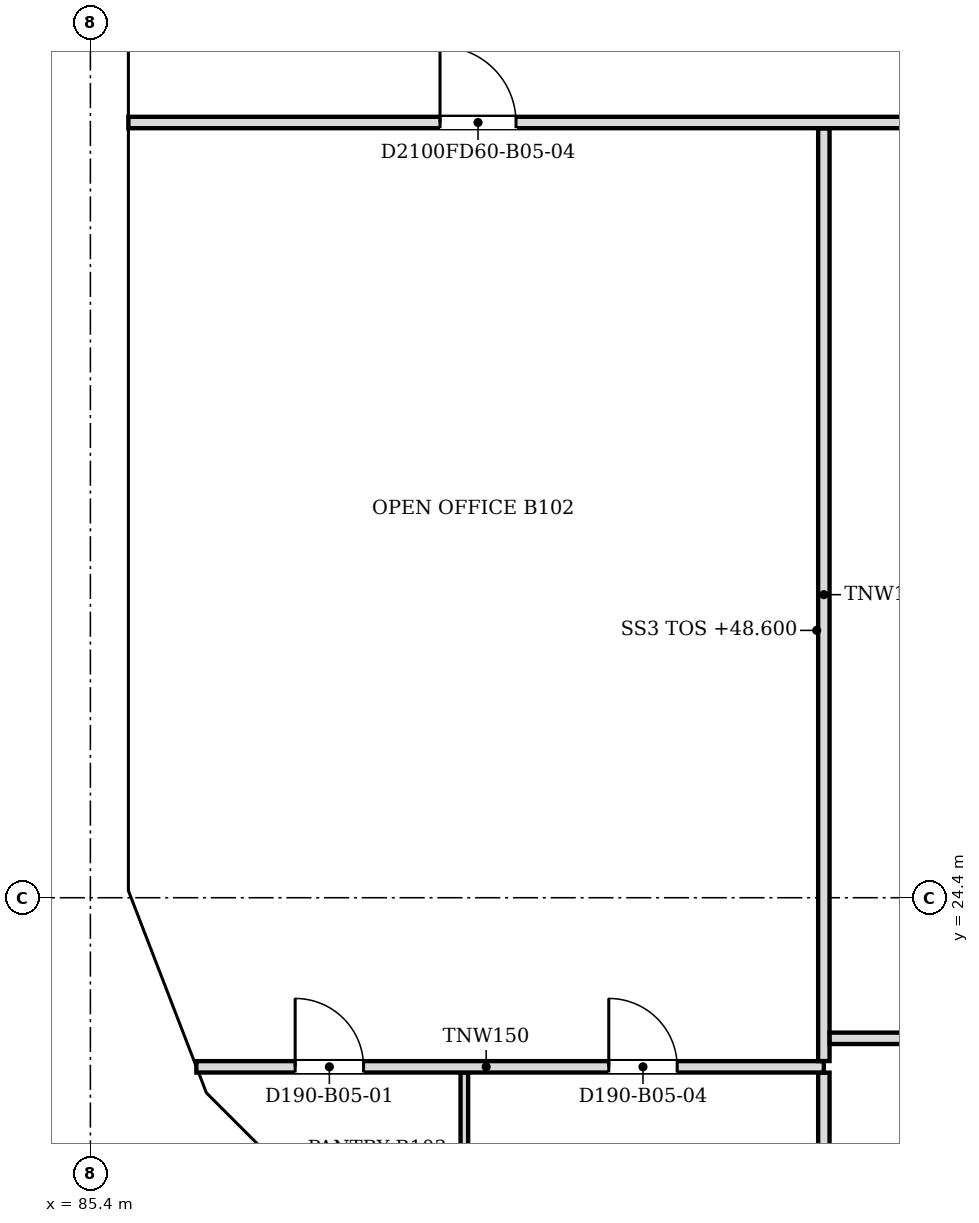
"""IFC4 building model, lengths in metres.
Left out: names, types, materials, properties, quantities, classifications, styles, units other than length and angle.
Written with IfcOpenShell. Run it as: python <this file> out.ifc"""

import sys

from ifc_helpers import new_model, si_unit, direction, frame, frame_2d, origin, place, context, subcontext, project, spatial, polyline, rectangle, outline, extrude, faceted_brep, source, transform, mapped, element, fill, save


model = new_model("IFC4")
c1 = context("Model", 3, precision=1e-05, world=origin(), true_north=direction((0.0, 1.0)))
c2 = subcontext(c1, "Body", "Model", "MODEL_VIEW")
j1 = project(units=[si_unit("LENGTHUNIT", "METRE"), si_unit("PLANEANGLEUNIT", "RADIAN")], contexts=[c1])
p1 = place(None, origin())
s1 = spatial("IfcSite", under=j1, at=p1, CompositionType="ELEMENT")
p2 = place(p1, origin())
s2 = spatial("IfcBuilding", under=s1, at=p2, CompositionType="ELEMENT")
p3 = place(p2, frame((0.0, 0.0, 48.6)))
s3 = spatial("IfcBuildingStorey", under=s2, at=p3, CompositionType="ELEMENT", Elevation=48.6)
m1 = source(origin(), c2, "Body", "SweptSolid", [
    extrude(outline(polyline([(3.05, 0.0), (6.1, 3.8), (3.05, 7.6), (0.0, 3.8), (3.05, 0.0)])), frame((0.0, 0.25, 0.0), z_axis=(0.0, -1.0, 0.0), x_axis=(1.0, 0.0, 0.0)), (0.0, 0.0, 1.0), 0.5),
])
p4 = place(p3, frame((85.65, 36.6, -3.8), z_axis=(0.0, 0.0, 1.0), x_axis=(0.0, -1.0, 0.0)))
e1 = element("IfcWall", 1, at=p4, inside=s3, PredefinedType="SOLIDWALL", context=c2, shape_type="MappedRepresentation", body=[
    mapped(m1, transform((0.0, 0.0, 0.0), scale=1.0)),
])
m2 = source(origin(), c2, "Body", "SweptSolid", [
    extrude(outline(polyline([(3.05, 0.399), (5.78, 3.8), (3.05, 7.2), (0.321, 3.8), (3.05, 0.399)])), frame((0.0, 0.26, 0.0), z_axis=(0.0, -1.0, 0.0), x_axis=(1.0, 0.0, 0.0)), (0.0, 0.0, 1.0), 0.52),
])
p5 = place(p4, origin())
e2 = element("IfcOpeningElement", 2, at=p5, cuts=e1, PredefinedType="OPENING", context=c2, shape_type="MappedRepresentation", body=[
    mapped(m2, transform((0.0, 0.0, 0.0), scale=1.0)),
])
m3 = source(origin(), c2, "Body", "Brep", [
    faceted_brep([(3.05, -0.25, 0.0), (6.053, -0.25, 3.8), (3.05, -0.25, 7.6), (0.0, -0.25, 3.8), (0.0, 0.25, 3.8), (3.05, 0.25, 7.6), (6.007, 0.25, 3.859), (6.007, 0.25, 3.741), (3.05, 0.25, 0.0), (6.053, 0.0, 3.8)], [[[0, 1, 2, 3]], [[4, 5, 6, 7, 8]], [[8, 7, 9, 1, 0]], [[6, 5, 2, 1, 9]], [[5, 4, 3, 2]], [[4, 8, 0, 3]], [[7, 6, 9]]]),
])
p6 = place(p3, frame((85.65, 30.5, -3.8), z_axis=(0.0, 0.0, 1.0), x_axis=(0.0, -1.0, 0.0)))
e3 = element("IfcWall", 3, at=p6, inside=s3, PredefinedType="SOLIDWALL", context=c2, shape_type="MappedRepresentation", body=[
    mapped(m3, transform((0.0, 0.0, 0.0), scale=1.0)),
])
m4 = source(origin(), c2, "Body", "SweptSolid", [
    extrude(outline(polyline([(3.049, 0.401), (5.735, 3.8), (3.049, 7.199), (0.321, 3.8), (3.049, 0.401)])), frame((0.0, 0.26, 0.0), z_axis=(0.0, -1.0, 0.0), x_axis=(1.0, 0.0, 0.0)), (0.0, 0.0, 1.0), 0.52),
])
p7 = place(p6, origin())
e4 = element("IfcOpeningElement", 4, at=p7, cuts=e3, PredefinedType="OPENING", context=c2, shape_type="MappedRepresentation", body=[
    mapped(m4, transform((0.0, 0.0, 0.0), scale=1.0)),
])
m5 = source(origin(), c2, "Body", "Brep", [
    faceted_brep([(2.95, -0.25, 0.0), (3.003, -0.25, 0.068), (3.003, -0.25, 7.531), (2.95, -0.25, 7.6), (0.0, -0.25, 3.8), (0.047, 0.25, 3.86), (2.898, 0.25, 7.532), (2.898, 0.25, 0.068), (0.047, 0.25, 3.74), (2.95, 0.0, 0.0), (2.95, 0.0, 7.6), (0.0, 0.0, 3.8)], [[[0, 1, 2, 3, 4]], [[5, 6, 7, 8]], [[1, 0, 9]], [[10, 3, 2]], [[6, 5, 11, 4, 3, 10]], [[8, 7, 9, 0, 4, 11]], [[8, 11, 5]], [[1, 9, 7, 6, 10, 2]]]),
])
p8 = place(p3, frame((85.65, 24.447, -3.8), z_axis=(0.0, 0.0, 1.0), x_axis=(0.35992665181, -0.932980602862, 0.0)))
e5 = element("IfcWall", 5, at=p8, inside=s3, PredefinedType="SOLIDWALL", context=c2, shape_type="MappedRepresentation", body=[
    mapped(m5, transform((0.0, 0.0, 0.0), scale=1.0)),
])
m6 = source(origin(), c2, "Body", "SweptSolid", [
    extrude(outline(polyline([(2.75, 6.935), (0.316, 3.8), (2.75, 0.665), (2.75, 6.935)])), frame((0.0, 0.26, 0.0), z_axis=(0.0, -1.0, 0.0), x_axis=(1.0, 0.0, 0.0)), (0.0, 0.0, 1.0), 0.52),
])
p9 = place(p8, origin())
e6 = element("IfcOpeningElement", 6, at=p9, cuts=e5, PredefinedType="OPENING", context=c2, shape_type="MappedRepresentation", body=[
    mapped(m6, transform((0.0, 0.0, 0.0), scale=1.0)),
])
m7 = source(origin(), c2, "Body", "Brep", [
    faceted_brep([(0.053, -0.25, 0.0), (2.997, -0.25, 3.8), (0.053, -0.25, 7.6), (0.0, -0.25, 7.532), (0.0, -0.25, 0.068), (0.106, 0.25, 7.531), (2.944, 0.25, 3.868), (2.944, 0.25, 3.732), (0.106, 0.25, 0.068), (2.997, 0.0, 3.8), (0.053, 0.0, 0.0), (0.053, 0.0, 7.6)], [[[0, 1, 2, 3, 4]], [[5, 6, 7, 8]], [[8, 7, 9, 1, 0, 10]], [[6, 5, 11, 2, 1, 9]], [[3, 2, 11]], [[10, 0, 4]], [[8, 10, 4, 3, 11, 5]], [[7, 6, 9]]]),
])
p10 = place(p3, frame((86.675, 21.731, -3.8), z_axis=(0.0, 0.0, 1.0), x_axis=(0.707106781187, -0.707106781187, 0.0)))
e7 = element("IfcWall", 7, at=p10, inside=s3, PredefinedType="SOLIDWALL", context=c2, shape_type="MappedRepresentation", body=[
    mapped(m7, transform((0.0, 0.0, 0.0), scale=1.0)),
])
m8 = source(origin(), c2, "Body", "SweptSolid", [
    extrude(outline(polyline([(0.253, 0.666), (2.681, 3.8), (0.253, 6.934), (0.253, 0.666)])), frame((0.0, 0.26, 0.0), z_axis=(0.0, -1.0, 0.0), x_axis=(1.0, 0.0, 0.0)), (0.0, 0.0, 1.0), 0.52),
])
p11 = place(p10, origin())
e8 = element("IfcOpeningElement", 8, at=p11, cuts=e7, PredefinedType="OPENING", context=c2, shape_type="MappedRepresentation", body=[
    mapped(m8, transform((0.0, 0.0, 0.0), scale=1.0)),
])
p12 = place(p2, frame((0.0, 0.0, 52.4)))
s4 = spatial("IfcBuildingStorey", under=s2, at=p12, CompositionType="ELEMENT", Elevation=52.4)
m9 = source(origin(), c2, "Body", "Brep", [
    faceted_brep([(3.05, -0.25, 0.0), (6.1, -0.25, 3.8), (6.1, -0.25, 3.8), (3.05, -0.25, 7.6), (0.0, -0.25, 3.8), (0.0, 0.25, 3.8), (3.05, 0.25, 7.6), (6.1, 0.25, 3.8), (6.1, 0.25, 3.8), (3.05, 0.25, 0.0)], [[[0, 1, 2, 3, 4]], [[5, 6, 7, 8, 9]], [[9, 8, 1, 0]], [[7, 6, 3, 2]], [[6, 5, 4, 3]], [[5, 9, 0, 4]], [[1, 8, 7, 2]]]),
])
p13 = place(p12, frame((85.65, 39.65, -3.8), z_axis=(0.0, 0.0, 1.0), x_axis=(0.0, -1.0, 0.0)))
e9 = element("IfcWall", 9, at=p13, inside=s4, PredefinedType="SOLIDWALL", context=c2, shape_type="MappedRepresentation", body=[
    mapped(m9, transform((0.0, 0.0, 0.0), scale=1.0)),
])
m10 = source(origin(), c2, "Body", "SweptSolid", [
    extrude(outline(polyline([(3.05, 0.399), (5.78, 3.8), (3.05, 7.2), (0.321, 3.8), (3.05, 0.399)])), frame((0.0, 0.26, 0.0), z_axis=(0.0, -1.0, 0.0), x_axis=(1.0, 0.0, 0.0)), (0.0, 0.0, 1.0), 0.52),
])
p14 = place(p13, origin())
e10 = element("IfcOpeningElement", 10, at=p14, cuts=e9, PredefinedType="OPENING", context=c2, shape_type="MappedRepresentation", body=[
    mapped(m10, transform((0.0, 0.0, 0.0), scale=1.0)),
])
m11 = source(origin(), c2, "Body", "SweptSolid", [
    extrude(outline(polyline([(3.05, 0.0), (6.1, 3.8), (3.05, 7.6), (0.0, 3.8), (3.05, 0.0)])), frame((0.0, 0.25, 0.0), z_axis=(0.0, -1.0, 0.0), x_axis=(1.0, 0.0, 0.0)), (0.0, 0.0, 1.0), 0.5),
])
p15 = place(p12, frame((85.65, 33.55, -3.8), z_axis=(0.0, 0.0, 1.0), x_axis=(0.0, -1.0, 0.0)))
e11 = element("IfcWall", 11, at=p15, inside=s4, PredefinedType="SOLIDWALL", context=c2, shape_type="MappedRepresentation", body=[
    mapped(m11, transform((0.0, 0.0, 0.0), scale=1.0)),
])
p16 = place(p15, origin())
e12 = element("IfcOpeningElement", 12, at=p16, cuts=e11, PredefinedType="OPENING", context=c2, shape_type="MappedRepresentation", body=[
    mapped(m10, transform((0.0, 0.0, 0.0), scale=1.0)),
])
m12 = source(origin(), c2, "Body", "Brep", [
    faceted_brep([(3.003, -0.25, 0.0), (3.05, -0.25, 0.06), (3.05, -0.25, 7.54), (3.003, -0.25, 7.6), (0.0, -0.25, 3.8), (0.0, 0.25, 3.8), (2.957, 0.25, 7.541), (2.957, 0.25, 0.059), (3.003, 0.0, 0.0), (3.003, 0.0, 7.6)], [[[0, 1, 2, 3, 4]], [[5, 6, 7]], [[1, 0, 8]], [[9, 3, 2]], [[6, 5, 4, 3, 9]], [[5, 7, 8, 0, 4]], [[1, 8, 7, 6, 9, 2]]]),
])
p17 = place(p12, frame((85.65, 27.45, -3.8), z_axis=(0.0, 0.0, 1.0), x_axis=(0.0, -1.0, 0.0)))
e13 = element("IfcWall", 13, at=p17, inside=s4, PredefinedType="SOLIDWALL", context=c2, shape_type="MappedRepresentation", body=[
    mapped(m12, transform((0.0, 0.0, 0.0), scale=1.0)),
])
m13 = source(origin(), c2, "Body", "SweptSolid", [
    extrude(outline(polyline([(2.803, 6.944), (0.319, 3.8), (2.803, 0.656), (2.803, 6.944)])), frame((0.0, 0.26, 0.0), z_axis=(0.0, -1.0, 0.0), x_axis=(1.0, 0.0, 0.0)), (0.0, 0.0, 1.0), 0.52),
])
p18 = place(p17, origin())
e14 = element("IfcOpeningElement", 14, at=p18, cuts=e13, PredefinedType="OPENING", context=c2, shape_type="MappedRepresentation", body=[
    mapped(m13, transform((0.0, 0.0, 0.0), scale=1.0)),
])
m14 = source(origin(), c2, "Body", "Brep", [
    faceted_brep([(0.047, -0.25, 0.0), (2.997, -0.25, 3.8), (0.047, -0.25, 7.6), (0.0, -0.25, 7.541), (0.0, -0.25, 0.059), (0.093, 0.25, 7.54), (2.944, 0.25, 3.868), (2.944, 0.25, 3.732), (0.093, 0.25, 0.06), (2.997, 0.0, 3.8), (0.047, 0.0, 0.0), (0.047, 0.0, 7.6)], [[[0, 1, 2, 3, 4]], [[5, 6, 7, 8]], [[8, 7, 9, 1, 0, 10]], [[6, 5, 11, 2, 1, 9]], [[3, 2, 11]], [[10, 0, 4]], [[8, 10, 4, 3, 11, 5]], [[9, 7, 6]]]),
])
p19 = place(p12, frame((85.633, 24.49, -3.8), z_axis=(0.0, 0.0, 1.0), x_axis=(0.359901446078, -0.932990326376, 0.0)))
e15 = element("IfcWall", 15, at=p19, inside=s4, PredefinedType="SOLIDWALL", context=c2, shape_type="MappedRepresentation", body=[
    mapped(m14, transform((0.0, 0.0, 0.0), scale=1.0)),
])
m15 = source(origin(), c2, "Body", "SweptSolid", [
    extrude(outline(polyline([(0.247, 0.665), (2.681, 3.8), (0.247, 6.935), (0.247, 0.665)])), frame((0.0, 0.26, 0.0), z_axis=(0.0, -1.0, 0.0), x_axis=(1.0, 0.0, 0.0)), (0.0, 0.0, 1.0), 0.52),
])
p20 = place(p19, origin())
e16 = element("IfcOpeningElement", 16, at=p20, cuts=e15, PredefinedType="OPENING", context=c2, shape_type="MappedRepresentation", body=[
    mapped(m15, transform((0.0, 0.0, 0.0), scale=1.0)),
])
m16 = source(origin(), c2, "Body", "Brep", [
    faceted_brep([(2.944, -0.25, 0.0), (2.997, -0.25, 0.068), (2.997, -0.25, 7.532), (2.944, -0.25, 7.6), (0.0, -0.25, 3.8), (0.053, 0.25, 3.868), (2.891, 0.25, 7.532), (2.891, 0.25, 0.068), (0.053, 0.25, 3.731), (2.944, 0.0, 0.0), (2.944, 0.0, 7.6), (0.0, 0.0, 3.8)], [[[0, 1, 2, 3, 4]], [[5, 6, 7, 8]], [[1, 0, 9]], [[10, 3, 2]], [[6, 5, 11, 4, 3, 10]], [[8, 7, 9, 0, 4, 11]], [[8, 11, 5]], [[1, 9, 7, 6, 10, 2]]]),
])
p21 = place(p12, frame((86.712, 21.694, -3.8), z_axis=(0.0, 0.0, 1.0), x_axis=(0.707066050402, -0.707147509625, 0.0)))
e17 = element("IfcWall", 17, at=p21, inside=s4, PredefinedType="SOLIDWALL", context=c2, shape_type="MappedRepresentation", body=[
    mapped(m16, transform((0.0, 0.0, 0.0), scale=1.0)),
])
m17 = source(origin(), c2, "Body", "SweptSolid", [
    extrude(outline(polyline([(2.744, 6.934), (0.316, 3.8), (2.744, 0.666), (2.744, 6.934)])), frame((0.0, 0.26, 0.0), z_axis=(0.0, -1.0, 0.0), x_axis=(1.0, 0.0, 0.0)), (0.0, 0.0, 1.0), 0.52),
])
p22 = place(p21, origin())
e18 = element("IfcOpeningElement", 18, at=p22, cuts=e17, PredefinedType="OPENING", context=c2, shape_type="MappedRepresentation", body=[
    mapped(m17, transform((0.0, 0.0, 0.0), scale=1.0)),
])
p23 = place(p3, frame((95.05, 18.8, 0.0), z_axis=(0.0, 0.0, 1.0), x_axis=(0.0, 1.0, 0.0)))
e19 = element("IfcWall", 19, at=p23, inside=s3, PredefinedType="PARTITIONING", context=c2, shape_type="SweptSolid", body=[
    extrude(rectangle(XDim=3.299, YDim=0.15, at=frame_2d((1.649, 0.0))), origin(), (0.0, 0.0, 1.0), 3.067),
])
p24 = place(p3, frame((90.32, 19.291, 0.0), z_axis=(0.0, 0.0, 1.0), x_axis=(0.0, 1.0, 0.0)))
e20 = element("IfcWall", 20, at=p24, inside=s3, PredefinedType="PARTITIONING", context=c2, shape_type="SweptSolid", body=[
    extrude(rectangle(XDim=2.808, YDim=0.1, at=frame_2d((1.404, 0.0))), origin(), (0.0, 0.0, 1.0), 3.067),
])
p25 = place(p3, frame((95.05, 22.175, 0.0), z_axis=(0.0, 0.0, 1.0), x_axis=(-1.0, 0.0, 0.0)))
e21 = element("IfcWall", 21, at=p25, inside=s3, PredefinedType="PARTITIONING", context=c2, shape_type="SweptSolid", body=[
    extrude(rectangle(XDim=8.256, YDim=0.15, at=frame_2d((4.128, 0.0))), origin(), (0.0, 0.0, 1.0), 3.067),
])
m18 = source(origin(), c2, "Body", "SweptSolid", [
    extrude(rectangle(XDim=0.9, YDim=2.1, at=frame_2d((0.45, 1.05))), frame((0.0, 0.085, 0.0), z_axis=(0.0, -1.0, 0.0), x_axis=(1.0, 0.0, 0.0)), (0.0, 0.0, 1.0), 0.17),
])
p26 = place(p25, frame((6.056, 0.0, 0.0)))
e22 = element("IfcOpeningElement", 22, at=p26, cuts=e21, PredefinedType="OPENING", context=c2, shape_type="MappedRepresentation", body=[
    mapped(m18, transform((0.0, 0.0, 0.0), scale=1.0)),
])
p27 = place(p25, frame((1.93, 0.0, 0.0)))
e23 = element("IfcOpeningElement", 23, at=p27, cuts=e21, PredefinedType="OPENING", context=c2, shape_type="MappedRepresentation", body=[
    mapped(m18, transform((0.0, 0.0, 0.0), scale=1.0)),
])
p28 = place(p3, frame((95.05, 22.251, 0.0), z_axis=(0.0, 0.0, 1.0), x_axis=(0.0, 1.0, 0.0)))
e24 = element("IfcWall", 24, at=p28, inside=s3, PredefinedType="PARTITIONING", context=c2, shape_type="SweptSolid", body=[
    extrude(rectangle(XDim=12.273, YDim=0.15, at=frame_2d((6.136, 0.0))), origin(), (0.0, 0.0, 1.0), 3.067),
])
p29 = place(p3, frame((107.25, 22.55, 0.0), z_axis=(0.0, 0.0, 1.0), x_axis=(-1.0, 0.0, 0.0)))
e25 = element("IfcWall", 25, at=p29, inside=s3, PredefinedType="PARTITIONING", context=c2, shape_type="SweptSolid", body=[
    extrude(rectangle(XDim=12.124, YDim=0.15, at=frame_2d((6.062, 0.0))), origin(), (0.0, 0.0, 1.0), 3.067),
])
p30 = place(p29, frame((8.624, 0.0, 0.0)))
e26 = element("IfcOpeningElement", 26, at=p30, cuts=e25, PredefinedType="OPENING", context=c2, shape_type="MappedRepresentation", body=[
    mapped(m18, transform((0.0, 0.0, 0.0), scale=1.0)),
])
p31 = place(p29, frame((2.706, 0.0, 0.0)))
e27 = element("IfcOpeningElement", 27, at=p31, cuts=e25, PredefinedType="OPENING", context=c2, shape_type="MappedRepresentation", body=[
    mapped(m18, transform((0.0, 0.0, 0.0), scale=1.0)),
])
p32 = place(p3, frame((133.7, 34.6, 0.0), z_axis=(0.0, 0.0, 1.0), x_axis=(-1.0, 0.0, 0.0)))
e28 = element("IfcWall", 28, at=p32, inside=s3, PredefinedType="PARTITIONING", context=c2, shape_type="SweptSolid", body=[
    extrude(rectangle(XDim=47.8, YDim=0.15, at=frame_2d((23.9, 0.0))), origin(), (0.0, 0.0, 1.0), 3.067),
])
m19 = source(origin(), c2, "Body", "SweptSolid", [
    extrude(rectangle(XDim=1.0, YDim=2.1, at=frame_2d((0.5, 1.05))), frame((0.0, 0.085, 0.0), z_axis=(0.0, -1.0, 0.0), x_axis=(1.0, 0.0, 0.0)), (0.0, 0.0, 1.0), 0.17),
])
p33 = place(p32, frame((3.549, 0.0, 0.0)))
e29 = element("IfcOpeningElement", 29, at=p33, cuts=e28, PredefinedType="OPENING", context=c2, shape_type="MappedRepresentation", body=[
    mapped(m19, transform((0.0, 0.0, 0.0), scale=1.0)),
])
p34 = place(p32, frame((42.7, 0.0, 0.0)))
e30 = element("IfcOpeningElement", 30, at=p34, cuts=e28, PredefinedType="OPENING", context=c2, shape_type="MappedRepresentation", body=[
    mapped(m19, transform((0.0, 0.0, 0.0), scale=1.0)),
])
p35 = place(p32, frame((12.299, 0.0, 0.0)))
e31 = element("IfcOpeningElement", 31, at=p35, cuts=e28, PredefinedType="OPENING", context=c2, shape_type="MappedRepresentation", body=[
    mapped(m18, transform((0.0, 0.0, 0.0), scale=1.0)),
])
p36 = place(p32, frame((21.349, 0.0, 0.0)))
e32 = element("IfcOpeningElement", 32, at=p36, cuts=e28, PredefinedType="OPENING", context=c2, shape_type="MappedRepresentation", body=[
    mapped(m19, transform((0.0, 0.0, 0.0), scale=1.0)),
])
p37 = place(p32, frame((32.05, 0.0, 0.0)))
e33 = element("IfcOpeningElement", 33, at=p37, cuts=e28, PredefinedType="OPENING", context=c2, shape_type="MappedRepresentation", body=[
    mapped(m19, transform((0.0, 0.0, 0.0), scale=1.0)),
])
m20 = source(origin(), c2, "Body", "SweptSolid", [
    extrude(rectangle(XDim=0.9, YDim=2.1, at=frame_2d((0.45, 1.05))), frame((0.0, 0.025, 0.0), z_axis=(0.0, -1.0, 0.0), x_axis=(1.0, 0.0, 0.0)), (0.0, 0.0, 1.0), 0.05),
])
p38 = place(p26, origin())
e34 = element("IfcDoor", 34, at=p38, inside=s3, OperationType="SINGLE_SWING_RIGHT", PredefinedType="DOOR", context=c2, shape_type="MappedRepresentation", body=[
    mapped(m20, transform((0.0, 0.0, 0.0), scale=1.0)),
])
fill(e22, e34)
p39 = place(p27, origin())
e35 = element("IfcDoor", 35, at=p39, inside=s3, OperationType="SINGLE_SWING_RIGHT", PredefinedType="DOOR", context=c2, shape_type="MappedRepresentation", body=[
    mapped(m20, transform((0.0, 0.0, 0.0), scale=1.0)),
])
fill(e23, e35)
m21 = source(origin(), c2, "Body", "SweptSolid", [
    extrude(rectangle(XDim=1.0, YDim=2.1, at=frame_2d((0.5, 1.05))), frame((0.0, 0.025, 0.0), z_axis=(0.0, -1.0, 0.0), x_axis=(1.0, 0.0, 0.0)), (0.0, 0.0, 1.0), 0.05),
])
p40 = place(p34, origin())
e36 = element("IfcDoor", 36, at=p40, inside=s3, OperationType="SINGLE_SWING_RIGHT", PredefinedType="DOOR", context=c2, shape_type="MappedRepresentation", body=[
    mapped(m21, transform((0.0, 0.0, 0.0), scale=1.0)),
])
fill(e30, e36)
save(model, sys.argv[1])
